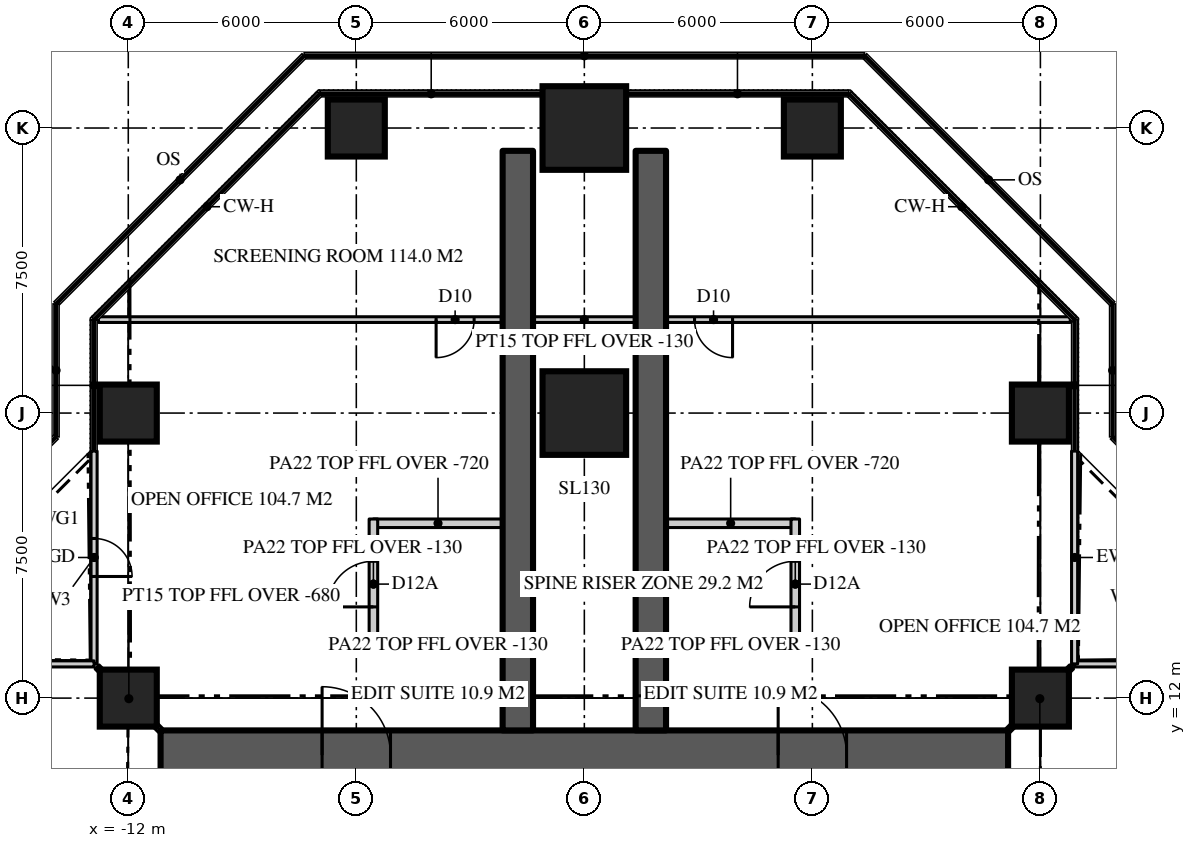
"""IFC4 building model, lengths in metres.
Left out: names, types, materials, properties, quantities, classifications, styles, units other than length and angle.
Written with IfcOpenShell. Run it as: python <this file> out.ifc"""

import sys

from ifc_helpers import new_model, si_unit, direction, frame, frame_2d, origin, origin_2d, place, context, subcontext, project, spatial, rectangle, extrude, element, fill, save


model = new_model("IFC4")
c1 = context("Model", 3, precision=1e-05, world=origin(), true_north=direction((0.0, 1.0)))
c2 = subcontext(c1, "Body", "Model", "MODEL_VIEW")
j1 = project(units=[si_unit("LENGTHUNIT", "METRE"), si_unit("PLANEANGLEUNIT", "RADIAN")], contexts=[c1])
p1 = place(None, origin())
s1 = spatial("IfcSite", under=j1, at=p1, CompositionType="ELEMENT")
p2 = place(p1, origin())
s2 = spatial("IfcBuilding", under=s1, at=p2, CompositionType="ELEMENT")
p3 = place(p2, frame((0.0, 0.0, 232.2)))
s3 = spatial("IfcBuildingStorey", under=s2, at=p3, CompositionType="ELEMENT", Elevation=232.2)
p4 = place(p3, frame((-11.15, 10.5, 0.0), z_axis=(0.0, 0.0, 1.0), x_axis=(1.0, 0.0, 0.0)))
e1 = element("IfcWall", 1, at=p4, inside=s3, PredefinedType="SHEAR", context=c2, shape_type="SweptSolid", body=[
    extrude(rectangle(XDim=22.3, YDim=1.3, at=frame_2d((11.15, 0.0))), origin(), (0.0, 0.0, 1.0), 3.9),
])
p5 = place(p4, frame((4.25, 0.0, 0.0)))
e2 = element("IfcOpeningElement", 2, at=p5, cuts=e1, PredefinedType="OPENING", context=c2, shape_type="SweptSolid", body=[
    extrude(rectangle(XDim=1.8, YDim=2.2, at=frame_2d((0.9, 1.1))), frame((0.0, 0.66, 0.0), z_axis=(0.0, -1.0, 0.0), x_axis=(1.0, 0.0, 0.0)), (0.0, 0.0, 1.0), 1.32),
])
p6 = place(p4, frame((16.25, 0.0, 0.0)))
e3 = element("IfcOpeningElement", 3, at=p6, cuts=e1, PredefinedType="OPENING", context=c2, shape_type="SweptSolid", body=[
    extrude(rectangle(XDim=1.8, YDim=2.2, at=frame_2d((0.9, 1.1))), frame((0.0, 0.66, 0.0), z_axis=(0.0, -1.0, 0.0), x_axis=(1.0, 0.0, 0.0)), (0.0, 0.0, 1.0), 1.32),
])
for number, where, z_axis, x_axis in (
    (4, (1.75, 11.15, 0.0), (0.0, 0.0, 1.0), (0.0, 1.0, 0.0)),
    (5, (-1.75, 11.15, 0.0), (0.0, 0.0, 1.0), (0.0, 1.0, 0.0)),
):
    element("IfcWall", number, at=place(p3, frame(where, z_axis=z_axis, x_axis=x_axis)), inside=s3, PredefinedType="SHEAR", context=c2, shape_type="SweptSolid", body=[
        extrude(rectangle(XDim=15.25, YDim=0.8, at=frame_2d((7.625, 0.0))), origin(), (0.0, 0.0, 1.0), 3.9),
    ])
for number, where, z_axis, x_axis in (
    (6, (-12.0, 12.0, 0.0), (0.0, 0.0, 1.0), (1.0, 0.0, 0.0)),
    (7, (12.0, 12.0, 0.0), (0.0, 0.0, 1.0), (1.0, 0.0, 0.0)),
    (8, (-12.0, 19.5, 0.0), (0.0, 0.0, 1.0), (1.0, 0.0, 0.0)),
):
    element("IfcColumn", number, at=place(p3, frame(where, z_axis=z_axis, x_axis=x_axis)), inside=s3, PredefinedType="COLUMN", context=c2, shape_type="SweptSolid", body=[
        extrude(rectangle(XDim=1.5, YDim=1.5, at=origin_2d()), origin(), (0.0, 0.0, 1.0), 3.9),
    ])
p7 = place(p3, frame((0.0, 19.5, 0.0), z_axis=(0.0, 0.0, 1.0), x_axis=(1.0, 0.0, 0.0)))
e9 = element("IfcColumn", 9, at=p7, inside=s3, PredefinedType="COLUMN", context=c2, shape_type="SweptSolid", body=[
    extrude(rectangle(XDim=2.2, YDim=2.2, at=origin_2d()), origin(), (0.0, 0.0, 1.0), 3.9),
])
for number, where, z_axis, x_axis in (
    (10, (12.0, 19.5, 0.0), (0.0, 0.0, 1.0), (1.0, 0.0, 0.0)),
    (11, (-6.0, 27.0, 0.0), (0.0, 0.0, 1.0), (1.0, 0.0, 0.0)),
):
    element("IfcColumn", number, at=place(p3, frame(where, z_axis=z_axis, x_axis=x_axis)), inside=s3, PredefinedType="COLUMN", context=c2, shape_type="SweptSolid", body=[
        extrude(rectangle(XDim=1.5, YDim=1.5, at=origin_2d()), origin(), (0.0, 0.0, 1.0), 3.9),
    ])
p8 = place(p3, frame((0.0, 27.0, 0.0), z_axis=(0.0, 0.0, 1.0), x_axis=(1.0, 0.0, 0.0)))
e12 = element("IfcColumn", 12, at=p8, inside=s3, PredefinedType="COLUMN", context=c2, shape_type="SweptSolid", body=[
    extrude(rectangle(XDim=2.2, YDim=2.2, at=origin_2d()), origin(), (0.0, 0.0, 1.0), 3.9),
])
p9 = place(p3, frame((6.0, 27.0, 0.0), z_axis=(0.0, 0.0, 1.0), x_axis=(1.0, 0.0, 0.0)))
e13 = element("IfcColumn", 13, at=p9, inside=s3, PredefinedType="COLUMN", context=c2, shape_type="SweptSolid", body=[
    extrude(rectangle(XDim=1.5, YDim=1.5, at=origin_2d()), origin(), (0.0, 0.0, 1.0), 3.9),
])
p10 = place(p3, frame((18.5, 12.9, 0.0), z_axis=(0.0, 0.0, 1.0), x_axis=(-1.0, 0.0, 0.0)))
e14 = element("IfcWall", 14, at=p10, inside=s3, PredefinedType="SOLIDWALL", context=c2, shape_type="SweptSolid", body=[
    extrude(rectangle(XDim=5.6, YDim=0.16, at=frame_2d((2.8, 0.0))), origin(), (0.0, 0.0, 1.0), 3.77),
])
p11 = place(p10, frame((2.3, 0.0, 0.0)))
e15 = element("IfcOpeningElement", 15, at=p11, cuts=e14, PredefinedType="OPENING", context=c2, shape_type="SweptSolid", body=[
    extrude(rectangle(XDim=1.0, YDim=2.2, at=frame_2d((0.5, 1.1))), frame((0.0, 0.09, 0.0), z_axis=(0.0, -1.0, 0.0), x_axis=(1.0, 0.0, 0.0)), (0.0, 0.0, 1.0), 0.18),
])
p12 = place(p3, frame((12.9, 12.9, 0.0), z_axis=(0.0, 0.0, 1.0), x_axis=(0.0, 1.0, 0.0)))
e16 = element("IfcWall", 16, at=p12, inside=s3, PredefinedType="SOLIDWALL", context=c2, shape_type="SweptSolid", body=[
    extrude(rectangle(XDim=5.6, YDim=0.16, at=frame_2d((2.8, 0.0))), origin(), (0.0, 0.0, 1.0), 3.77),
])
p13 = place(p3, frame((-12.9, 18.5, 0.0), z_axis=(0.0, 0.0, 1.0), x_axis=(0.0, -1.0, 0.0)))
e17 = element("IfcWall", 17, at=p13, inside=s3, PredefinedType="SOLIDWALL", context=c2, shape_type="SweptSolid", body=[
    extrude(rectangle(XDim=5.6, YDim=0.16, at=frame_2d((2.8, 0.0))), origin(), (0.0, 0.0, 1.0), 3.77),
])
p14 = place(p13, frame((2.3, 0.0, 0.0)))
e18 = element("IfcOpeningElement", 18, at=p14, cuts=e17, PredefinedType="OPENING", context=c2, shape_type="SweptSolid", body=[
    extrude(rectangle(XDim=1.0, YDim=2.2, at=frame_2d((0.5, 1.1))), frame((0.0, 0.09, 0.0), z_axis=(0.0, -1.0, 0.0), x_axis=(1.0, 0.0, 0.0)), (0.0, 0.0, 1.0), 0.18),
])
p15 = place(p3, frame((-12.9, 12.9, 0.0), z_axis=(0.0, 0.0, 1.0), x_axis=(-1.0, 0.0, 0.0)))
e19 = element("IfcWall", 19, at=p15, inside=s3, PredefinedType="SOLIDWALL", context=c2, shape_type="SweptSolid", body=[
    extrude(rectangle(XDim=5.6, YDim=0.16, at=frame_2d((2.8, 0.0))), origin(), (0.0, 0.0, 1.0), 3.77),
])
p16 = place(p3, frame((12.786, 21.959, 0.0), z_axis=(0.0, 0.0, 1.0), x_axis=(-1.0, 0.0, 0.0)))
e20 = element("IfcWall", 20, at=p16, inside=s3, PredefinedType="PARTITIONING", context=c2, shape_type="SweptSolid", body=[
    extrude(rectangle(XDim=25.573, YDim=0.15, at=frame_2d((12.786, 0.0))), origin(), (0.0, 0.0, 1.0), 3.77),
])
p17 = place(p16, frame((15.687, 0.0, 0.0)))
e21 = element("IfcOpeningElement", 21, at=p17, cuts=e20, PredefinedType="OPENING", context=c2, shape_type="SweptSolid", body=[
    extrude(rectangle(XDim=1.0, YDim=2.2, at=frame_2d((0.5, 1.1))), frame((0.0, 0.085, 0.0), z_axis=(0.0, -1.0, 0.0), x_axis=(1.0, 0.0, 0.0)), (0.0, 0.0, 1.0), 0.17),
])
p18 = place(p16, frame((8.886, 0.0, 0.0)))
e22 = element("IfcOpeningElement", 22, at=p18, cuts=e20, PredefinedType="OPENING", context=c2, shape_type="SweptSolid", body=[
    extrude(rectangle(XDim=1.0, YDim=2.2, at=frame_2d((0.5, 1.1))), frame((0.0, 0.085, 0.0), z_axis=(0.0, -1.0, 0.0), x_axis=(1.0, 0.0, 0.0)), (0.0, 0.0, 1.0), 0.17),
])
p19 = place(p3, frame((-2.15, 13.4, 0.0), z_axis=(0.0, 0.0, 1.0), x_axis=(-1.0, 0.0, 0.0)))
e23 = element("IfcWall", 23, at=p19, inside=s3, PredefinedType="PARTITIONING", context=c2, shape_type="SweptSolid", body=[
    extrude(rectangle(XDim=3.4, YDim=0.225, at=frame_2d((1.7, 0.0))), origin(), (0.0, 0.0, 1.0), 3.77),
])
p20 = place(p3, frame((-2.15, 16.6, 0.0), z_axis=(0.0, 0.0, 1.0), x_axis=(-1.0, 0.0, 0.0)))
e24 = element("IfcWall", 24, at=p20, inside=s3, PredefinedType="PARTITIONING", context=c2, shape_type="SweptSolid", body=[
    extrude(rectangle(XDim=3.4, YDim=0.225, at=frame_2d((1.7, 0.0))), origin(), (0.0, 0.0, 1.0), 3.18),
])
p21 = place(p3, frame((-5.55, 13.288, 0.0), z_axis=(0.0, 0.0, 1.0), x_axis=(0.0, 1.0, 0.0)))
e25 = element("IfcWall", 25, at=p21, inside=s3, PredefinedType="PARTITIONING", context=c2, shape_type="SweptSolid", body=[
    extrude(rectangle(XDim=3.425, YDim=0.225, at=frame_2d((1.712, 0.0))), origin(), (0.0, 0.0, 1.0), 3.77),
])
p22 = place(p21, frame((1.113, 0.0, 0.0)))
e26 = element("IfcOpeningElement", 26, at=p22, cuts=e25, PredefinedType="OPENING", context=c2, shape_type="SweptSolid", body=[
    extrude(rectangle(XDim=1.2, YDim=2.2, at=frame_2d((0.6, 1.1))), frame((0.0, 0.123, 0.0), z_axis=(0.0, -1.0, 0.0), x_axis=(1.0, 0.0, 0.0)), (0.0, 0.0, 1.0), 0.245),
])
p23 = place(p3, frame((2.15, 13.4, 0.0), z_axis=(0.0, 0.0, 1.0), x_axis=(1.0, 0.0, 0.0)))
e27 = element("IfcWall", 27, at=p23, inside=s3, PredefinedType="PARTITIONING", context=c2, shape_type="SweptSolid", body=[
    extrude(rectangle(XDim=3.4, YDim=0.225, at=frame_2d((1.7, 0.0))), origin(), (0.0, 0.0, 1.0), 3.77),
])
p24 = place(p3, frame((2.15, 16.6, 0.0), z_axis=(0.0, 0.0, 1.0), x_axis=(1.0, 0.0, 0.0)))
e28 = element("IfcWall", 28, at=p24, inside=s3, PredefinedType="PARTITIONING", context=c2, shape_type="SweptSolid", body=[
    extrude(rectangle(XDim=3.4, YDim=0.225, at=frame_2d((1.7, 0.0))), origin(), (0.0, 0.0, 1.0), 3.18),
])
p25 = place(p3, frame((5.55, 13.288, 0.0), z_axis=(0.0, 0.0, 1.0), x_axis=(0.0, 1.0, 0.0)))
e29 = element("IfcWall", 29, at=p25, inside=s3, PredefinedType="PARTITIONING", context=c2, shape_type="SweptSolid", body=[
    extrude(rectangle(XDim=3.425, YDim=0.225, at=frame_2d((1.712, 0.0))), origin(), (0.0, 0.0, 1.0), 3.77),
])
p26 = place(p25, frame((1.113, 0.0, 0.0)))
e30 = element("IfcOpeningElement", 30, at=p26, cuts=e29, PredefinedType="OPENING", context=c2, shape_type="SweptSolid", body=[
    extrude(rectangle(XDim=1.2, YDim=2.2, at=frame_2d((0.6, 1.1))), frame((0.0, 0.123, 0.0), z_axis=(0.0, -1.0, 0.0), x_axis=(1.0, 0.0, 0.0)), (0.0, 0.0, 1.0), 0.245),
])
for number, where, z_axis, x_axis in (
    (31, (11.15, 11.15, 0.0), (0.0, 0.0, 1.0), (0.707, 0.707, 0.0)),
    (32, (-11.15, 11.15, 0.0), (0.0, 0.0, 1.0), (-0.707, 0.707, 0.0)),
):
    element("IfcWall", number, at=place(p3, frame(where, z_axis=z_axis, x_axis=x_axis)), inside=s3, PredefinedType="PARTITIONING", context=c2, shape_type="SweptSolid", body=[
        extrude(rectangle(XDim=2.362, YDim=0.15, at=frame_2d((1.181, 0.0))), origin(), (0.0, 0.0, 1.0), 3.22),
    ])
p27 = place(p14, origin())
e33 = element("IfcDoor", 33, at=p27, inside=s3, OperationType="SINGLE_SWING_RIGHT", PredefinedType="DOOR", context=c2, shape_type="SweptSolid", body=[
    extrude(rectangle(XDim=1.0, YDim=2.2, at=frame_2d((0.5, 1.1))), frame((0.0, 0.025, 0.0), z_axis=(0.0, -1.0, 0.0), x_axis=(1.0, 0.0, 0.0)), (0.0, 0.0, 1.0), 0.05),
])
fill(e18, e33)
p28 = place(p5, origin())
e34 = element("IfcDoor", 34, at=p28, inside=s3, OperationType="DOUBLE_DOOR_DOUBLE_SWING", PredefinedType="DOOR", context=c2, shape_type="SweptSolid", body=[
    extrude(rectangle(XDim=1.8, YDim=2.2, at=frame_2d((0.9, 1.1))), frame((0.0, 0.025, 0.0), z_axis=(0.0, -1.0, 0.0), x_axis=(1.0, 0.0, 0.0)), (0.0, 0.0, 1.0), 0.05),
])
fill(e2, e34)
p29 = place(p6, origin())
e35 = element("IfcDoor", 35, at=p29, inside=s3, OperationType="DOUBLE_DOOR_DOUBLE_SWING", PredefinedType="DOOR", context=c2, shape_type="SweptSolid", body=[
    extrude(rectangle(XDim=1.8, YDim=2.2, at=frame_2d((0.9, 1.1))), frame((0.0, 0.025, 0.0), z_axis=(0.0, -1.0, 0.0), x_axis=(1.0, 0.0, 0.0)), (0.0, 0.0, 1.0), 0.05),
])
fill(e3, e35)
p30 = place(p17, origin())
e36 = element("IfcDoor", 36, at=p30, inside=s3, OperationType="SINGLE_SWING_RIGHT", PredefinedType="DOOR", context=c2, shape_type="SweptSolid", body=[
    extrude(rectangle(XDim=1.0, YDim=2.2, at=frame_2d((0.5, 1.1))), frame((0.0, 0.025, 0.0), z_axis=(0.0, -1.0, 0.0), x_axis=(1.0, 0.0, 0.0)), (0.0, 0.0, 1.0), 0.05),
])
fill(e21, e36)
p31 = place(p18, origin())
e37 = element("IfcDoor", 37, at=p31, inside=s3, OperationType="SINGLE_SWING_LEFT", PredefinedType="DOOR", context=c2, shape_type="SweptSolid", body=[
    extrude(rectangle(XDim=1.0, YDim=2.2, at=frame_2d((0.5, 1.1))), frame((0.0, 0.025, 0.0), z_axis=(0.0, -1.0, 0.0), x_axis=(1.0, 0.0, 0.0)), (0.0, 0.0, 1.0), 0.05),
])
fill(e22, e37)
p32 = place(p22, origin())
e38 = element("IfcDoor", 38, at=p32, inside=s3, OperationType="SINGLE_SWING_LEFT", PredefinedType="DOOR", context=c2, shape_type="SweptSolid", body=[
    extrude(rectangle(XDim=1.2, YDim=2.2, at=frame_2d((0.6, 1.1))), frame((0.0, 0.025, 0.0), z_axis=(0.0, -1.0, 0.0), x_axis=(1.0, 0.0, 0.0)), (0.0, 0.0, 1.0), 0.05),
])
fill(e26, e38)
p33 = place(p26, origin())
e39 = element("IfcDoor", 39, at=p33, inside=s3, OperationType="SINGLE_SWING_LEFT", PredefinedType="DOOR", context=c2, shape_type="SweptSolid", body=[
    extrude(rectangle(XDim=1.2, YDim=2.2, at=frame_2d((0.6, 1.1))), frame((0.0, 0.025, 0.0), z_axis=(0.0, -1.0, 0.0), x_axis=(1.0, 0.0, 0.0)), (0.0, 0.0, 1.0), 0.05),
])
fill(e30, e39)
save(model, sys.argv[1])
